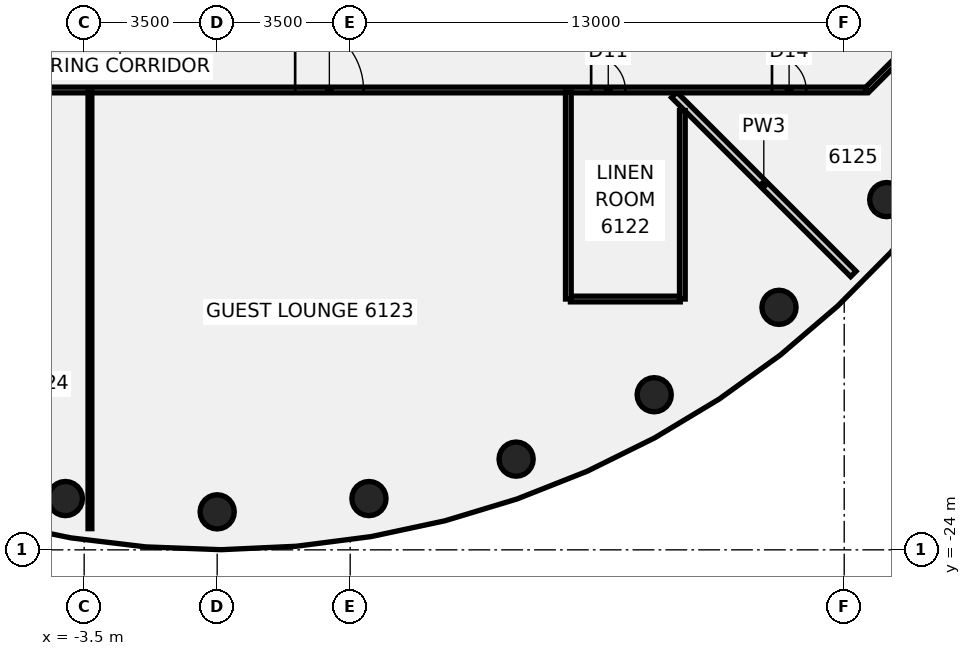
"""IFC4 building model, lengths in metres.
Left out: names, types, materials, properties, quantities, classifications, styles, units other than length and angle.
Written with IfcOpenShell. Run it as: python <this file> out.ifc"""

import sys

from ifc_helpers import new_model, si_unit, direction, frame, frame_2d, origin, origin_2d, place, context, subcontext, project, spatial, rectangle, circle, extrude, element, fill, save


model = new_model("IFC4")
c1 = context("Model", 3, precision=1e-05, world=origin(), true_north=direction((0.0, 1.0)))
c2 = subcontext(c1, "Body", "Model", "MODEL_VIEW")
j1 = project(units=[si_unit("LENGTHUNIT", "METRE"), si_unit("PLANEANGLEUNIT", "RADIAN")], contexts=[c1])
p1 = place(None, origin())
s1 = spatial("IfcSite", under=j1, at=p1, CompositionType="ELEMENT")
p2 = place(p1, origin())
s2 = spatial("IfcBuilding", under=s1, at=p2, CompositionType="ELEMENT")
p3 = place(p2, frame((0.0, 0.0, 241.5)))
s3 = spatial("IfcBuildingStorey", under=s2, at=p3, CompositionType="ELEMENT", Elevation=241.5)
for number, where, z_axis, x_axis in (
    (1, (-3.994, -22.651, -0.14), (0.0, 0.0, 1.0), (1.0, 0.0, 0.0)),
    (2, (0.0, -23.0, -0.14), (0.0, 0.0, 1.0), (1.0, 0.0, 0.0)),
    (3, (3.994, -22.651, -0.14), (0.0, 0.0, 1.0), (1.0, 0.0, 0.0)),
    (4, (7.866, -21.613, -0.14), (0.0, 0.0, 1.0), (1.0, 0.0, 0.0)),
    (5, (11.5, -19.919, -0.14), (0.0, 0.0, 1.0), (1.0, 0.0, 0.0)),
    (6, (14.784, -17.619, -0.14), (0.0, 0.0, 1.0), (1.0, 0.0, 0.0)),
    (7, (17.619, -14.784, -0.14), (0.0, 0.0, 1.0), (1.0, 0.0, 0.0)),
):
    element("IfcColumn", number, at=place(p3, frame(where, z_axis=z_axis, x_axis=x_axis)), inside=s3, PredefinedType="COLUMN", context=c2, shape_type="SweptSolid", body=[
        extrude(circle(Radius=0.45, at=origin_2d()), origin(), (0.0, 0.0, 1.0), 3.6),
    ])
p4 = place(p3, frame((12.027, -12.027, 0.0), z_axis=(0.0, 0.0, 1.0), x_axis=(0.707106781187, -0.707106781187, 0.0)))
e8 = element("IfcWall", 8, at=p4, inside=s3, PredefinedType="PARTITIONING", context=c2, shape_type="SweptSolid", body=[
    extrude(rectangle(XDim=6.665, YDim=0.2, at=frame_2d((3.333, 0.0))), origin(), (0.0, 0.0, 1.0), 2.864),
])
p5 = place(p3, frame((-17.1, -11.9, 0.0), z_axis=(0.0, 0.0, 1.0), x_axis=(1.0, 0.0, 0.0)))
e9 = element("IfcWall", 9, at=p5, inside=s3, PredefinedType="PARTITIONING", context=c2, shape_type="SweptSolid", body=[
    extrude(rectangle(XDim=34.165, YDim=0.15, at=frame_2d((17.083, 0.0))), origin(), (0.0, 0.0, 1.0), 2.864),
])
p6 = place(p5, frame((7.0, 0.0, 0.0)))
e10 = element("IfcOpeningElement", 10, at=p6, cuts=e9, PredefinedType="OPENING", context=c2, shape_type="SweptSolid", body=[
    extrude(rectangle(XDim=0.9, YDim=2.1, at=frame_2d((0.45, 1.05))), frame((0.0, 0.085, 0.0), z_axis=(0.0, -1.0, 0.0), x_axis=(1.0, 0.0, 0.0)), (0.0, 0.0, 1.0), 0.17),
])
p7 = place(p5, frame((26.941, 0.0, 0.0)))
e11 = element("IfcOpeningElement", 11, at=p7, cuts=e9, PredefinedType="OPENING", context=c2, shape_type="SweptSolid", body=[
    extrude(rectangle(XDim=0.9, YDim=2.1, at=frame_2d((0.45, 1.05))), frame((0.0, 0.085, 0.0), z_axis=(0.0, -1.0, 0.0), x_axis=(1.0, 0.0, 0.0)), (0.0, 0.0, 1.0), 0.17),
])
p8 = place(p5, frame((19.152, 0.0, 0.0)))
e12 = element("IfcOpeningElement", 12, at=p8, cuts=e9, PredefinedType="OPENING", context=c2, shape_type="SweptSolid", body=[
    extrude(rectangle(XDim=1.8, YDim=2.1, at=frame_2d((0.9, 1.05))), frame((0.0, 0.085, 0.0), z_axis=(0.0, -1.0, 0.0), x_axis=(1.0, 0.0, 0.0)), (0.0, 0.0, 1.0), 0.17),
])
p9 = place(p5, frame((10.359, 0.0, 0.0)))
e13 = element("IfcOpeningElement", 13, at=p9, cuts=e9, PredefinedType="OPENING", context=c2, shape_type="SweptSolid", body=[
    extrude(rectangle(XDim=1.8, YDim=2.1, at=frame_2d((0.9, 1.05))), frame((0.0, 0.085, 0.0), z_axis=(0.0, -1.0, 0.0), x_axis=(1.0, 0.0, 0.0)), (0.0, 0.0, 1.0), 0.17),
])
p10 = place(p5, frame((31.7, 0.0, 0.0)))
e14 = element("IfcOpeningElement", 14, at=p10, cuts=e9, PredefinedType="OPENING", context=c2, shape_type="SweptSolid", body=[
    extrude(rectangle(XDim=0.9, YDim=2.1, at=frame_2d((0.45, 1.05))), frame((0.0, 0.085, 0.0), z_axis=(0.0, -1.0, 0.0), x_axis=(1.0, 0.0, 0.0)), (0.0, 0.0, 1.0), 0.17),
])
p11 = place(p5, frame((2.85, 0.0, 0.0)))
e15 = element("IfcOpeningElement", 15, at=p11, cuts=e9, PredefinedType="OPENING", context=c2, shape_type="SweptSolid", body=[
    extrude(rectangle(XDim=0.9, YDim=2.1, at=frame_2d((0.45, 1.05))), frame((0.0, 0.085, 0.0), z_axis=(0.0, -1.0, 0.0), x_axis=(1.0, 0.0, 0.0)), (0.0, 0.0, 1.0), 0.17),
])
p12 = place(p3, frame((9.296, -17.4, 0.0), z_axis=(0.0, 0.0, 1.0), x_axis=(1.0, 0.0, 0.0)))
e16 = element("IfcWall", 16, at=p12, inside=s3, PredefinedType="PARTITIONING", context=c2, shape_type="SweptSolid", body=[
    extrude(rectangle(XDim=2.89, YDim=0.15, at=frame_2d((1.445, 0.0))), origin(), (0.0, 0.0, 1.0), 2.864),
])
p13 = place(p3, frame((17.1, -11.9, 0.0), z_axis=(0.0, 0.0, 1.0), x_axis=(0.707106781187, 0.707106781187, 0.0)))
e17 = element("IfcWall", 17, at=p13, inside=s3, PredefinedType="PARTITIONING", context=c2, shape_type="SweptSolid", body=[
    extrude(rectangle(XDim=2.505, YDim=0.15, at=frame_2d((1.253, 0.0))), origin(), (0.0, 0.0, 1.0), 2.864),
])
p14 = place(p3, frame((-3.348, -23.442, 0.0), z_axis=(0.0, 0.0, 1.0), x_axis=(0.0, 1.0, 0.0)))
e18 = element("IfcWall", 18, at=p14, inside=s3, PredefinedType="PARTITIONING", context=c2, shape_type="SweptSolid", body=[
    extrude(rectangle(XDim=11.487, YDim=0.1, at=frame_2d((5.744, 0.0))), origin(), (0.0, 0.0, 1.0), 2.864),
])
p15 = place(p3, frame((9.241, -17.4, 0.0), z_axis=(0.0, 0.0, 1.0), x_axis=(0.0, 1.0, 0.0)))
e19 = element("IfcWall", 19, at=p15, inside=s3, PredefinedType="PARTITIONING", context=c2, shape_type="SweptSolid", body=[
    extrude(rectangle(XDim=5.445, YDim=0.15, at=frame_2d((2.722, 0.0))), origin(), (0.0, 0.0, 1.0), 2.864),
])
p16 = place(p3, frame((12.241, -17.4, 0.0), z_axis=(0.0, 0.0, 1.0), x_axis=(0.0, 1.0, 0.0)))
e20 = element("IfcWall", 20, at=p16, inside=s3, PredefinedType="PARTITIONING", context=c2, shape_type="SweptSolid", body=[
    extrude(rectangle(XDim=4.959, YDim=0.15, at=frame_2d((2.479, 0.0))), origin(), (0.0, 0.0, 1.0), 2.864),
])
p17 = place(p7, frame((0.9, 0.0, 0.0), z_axis=(0.0, 0.0, 1.0), x_axis=(-1.0, 0.0, 0.0)))
e21 = element("IfcDoor", 21, at=p17, inside=s3, OperationType="SINGLE_SWING_RIGHT", PredefinedType="DOOR", context=c2, shape_type="SweptSolid", body=[
    extrude(rectangle(XDim=0.9, YDim=2.1, at=frame_2d((0.45, 1.05))), frame((0.0, 0.025, 0.0), z_axis=(0.0, -1.0, 0.0), x_axis=(1.0, 0.0, 0.0)), (0.0, 0.0, 1.0), 0.05),
])
fill(e11, e21)
p18 = place(p8, origin())
e22 = element("IfcDoor", 22, at=p18, inside=s3, OperationType="DOUBLE_DOOR_SINGLE_SWING", PredefinedType="DOOR", context=c2, shape_type="SweptSolid", body=[
    extrude(rectangle(XDim=1.8, YDim=2.1, at=frame_2d((0.9, 1.05))), frame((0.0, 0.025, 0.0), z_axis=(0.0, -1.0, 0.0), x_axis=(1.0, 0.0, 0.0)), (0.0, 0.0, 1.0), 0.05),
])
fill(e12, e22)
p19 = place(p10, frame((0.9, 0.0, 0.0), z_axis=(0.0, 0.0, 1.0), x_axis=(-1.0, 0.0, 0.0)))
e23 = element("IfcDoor", 23, at=p19, inside=s3, OperationType="SINGLE_SWING_RIGHT", PredefinedType="DOOR", context=c2, shape_type="SweptSolid", body=[
    extrude(rectangle(XDim=0.9, YDim=2.1, at=frame_2d((0.45, 1.05))), frame((0.0, 0.025, 0.0), z_axis=(0.0, -1.0, 0.0), x_axis=(1.0, 0.0, 0.0)), (0.0, 0.0, 1.0), 0.05),
])
fill(e14, e23)
save(model, sys.argv[1])
